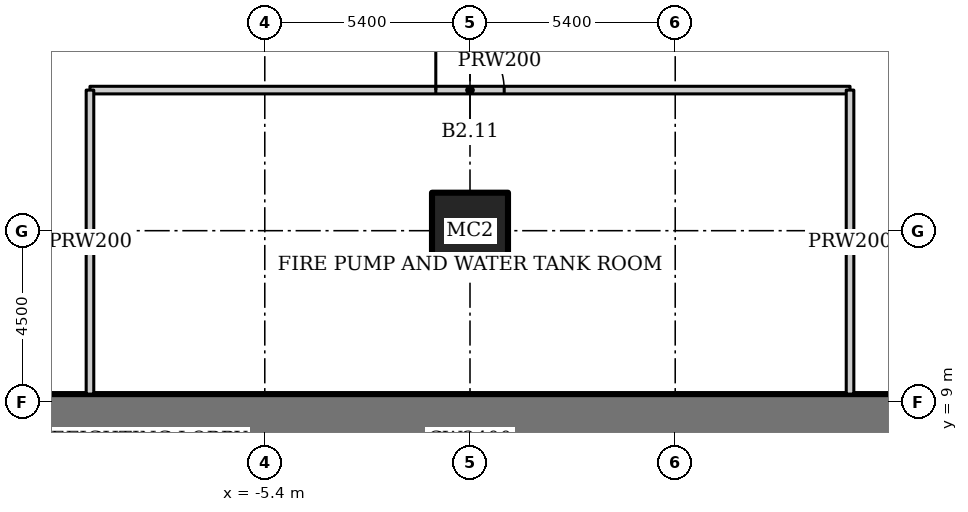
"""IFC4 building model, lengths in metres.
Left out: names, types, materials, properties, quantities, classifications, styles, units other than length and angle.
Written with IfcOpenShell. Run it as: python <this file> out.ifc"""

import sys

from ifc_helpers import new_model, si_unit, direction, frame, frame_2d, origin, origin_2d, place, context, subcontext, project, spatial, rectangle, hollow_rectangle, extrude, element, fill, save


model = new_model("IFC4")
c1 = context("Model", 3, precision=1e-05, world=origin(), true_north=direction((0.0, 1.0)))
c2 = subcontext(c1, "Body", "Model", "MODEL_VIEW")
j1 = project(units=[si_unit("LENGTHUNIT", "METRE"), si_unit("PLANEANGLEUNIT", "RADIAN")], contexts=[c1])
p1 = place(None, origin())
s1 = spatial("IfcSite", under=j1, at=p1, CompositionType="ELEMENT")
p2 = place(p1, origin())
s2 = spatial("IfcBuilding", under=s1, at=p2, CompositionType="ELEMENT")
p3 = place(p2, frame((0.0, 0.0, -10.0)))
s3 = spatial("IfcBuildingStorey", under=s2, at=p3, CompositionType="ELEMENT", Elevation=-10.0)
p4 = place(p3, frame((0.0, 13.5, 0.0), z_axis=(0.0, 0.0, 1.0), x_axis=(1.0, 0.0, 0.0)))
e1 = element("IfcColumn", 1, at=p4, inside=s3, PredefinedType="COLUMN", context=c2, shape_type="SweptSolid", body=[
    extrude(hollow_rectangle(XDim=2.0, YDim=2.0, WallThickness=0.17, at=origin_2d()), origin(), (0.0, 0.0, 1.0), 4.5),
])
p5 = place(p3, frame((12.2, 8.0, 0.0), z_axis=(0.0, 0.0, 1.0), x_axis=(-1.0, 0.0, 0.0)))
e2 = element("IfcWall", 2, at=p5, inside=s3, PredefinedType="SHEAR", context=c2, shape_type="SweptSolid", body=[
    extrude(rectangle(XDim=24.4, YDim=2.4, at=frame_2d((12.2, 0.0))), origin(), (0.0, 0.0, 1.0), 4.5),
])
p6 = place(p3, frame((-10.0, 17.2, 0.0), z_axis=(0.0, 0.0, 1.0), x_axis=(1.0, 0.0, 0.0)))
e3 = element("IfcWall", 3, at=p6, inside=s3, PredefinedType="SOLIDWALL", context=c2, shape_type="SweptSolid", body=[
    extrude(rectangle(XDim=20.0, YDim=0.2, at=frame_2d((10.0, 0.0))), origin(), (0.0, 0.0, 1.0), 4.2),
])
p7 = place(p6, frame((9.1, 0.0, 0.0)))
e4 = element("IfcOpeningElement", 4, at=p7, cuts=e3, PredefinedType="OPENING", context=c2, shape_type="SweptSolid", body=[
    extrude(rectangle(XDim=1.8, YDim=2.1, at=frame_2d((0.9, 1.05))), frame((0.0, 0.11, 0.0), z_axis=(0.0, -1.0, 0.0), x_axis=(1.0, 0.0, 0.0)), (0.0, 0.0, 1.0), 0.22),
])
for number, where, z_axis, x_axis in (
    (5, (-10.0, 9.2, 0.0), (0.0, 0.0, 1.0), (0.0, 1.0, 0.0)),
    (6, (10.0, 9.2, 0.0), (0.0, 0.0, 1.0), (0.0, 1.0, 0.0)),
):
    element("IfcWall", number, at=place(p3, frame(where, z_axis=z_axis, x_axis=x_axis)), inside=s3, PredefinedType="SOLIDWALL", context=c2, shape_type="SweptSolid", body=[
        extrude(rectangle(XDim=8.0, YDim=0.2, at=frame_2d((4.0, 0.0))), origin(), (0.0, 0.0, 1.0), 4.2),
    ])
p8 = place(p7, origin())
e7 = element("IfcDoor", 7, at=p8, inside=s3, OperationType="DOUBLE_DOOR_DOUBLE_SWING", PredefinedType="DOOR", context=c2, shape_type="SweptSolid", body=[
    extrude(rectangle(XDim=1.8, YDim=2.1, at=frame_2d((0.9, 1.05))), frame((0.0, 0.025, 0.0), z_axis=(0.0, -1.0, 0.0), x_axis=(1.0, 0.0, 0.0)), (0.0, 0.0, 1.0), 0.05),
])
fill(e4, e7)
save(model, sys.argv[1])
